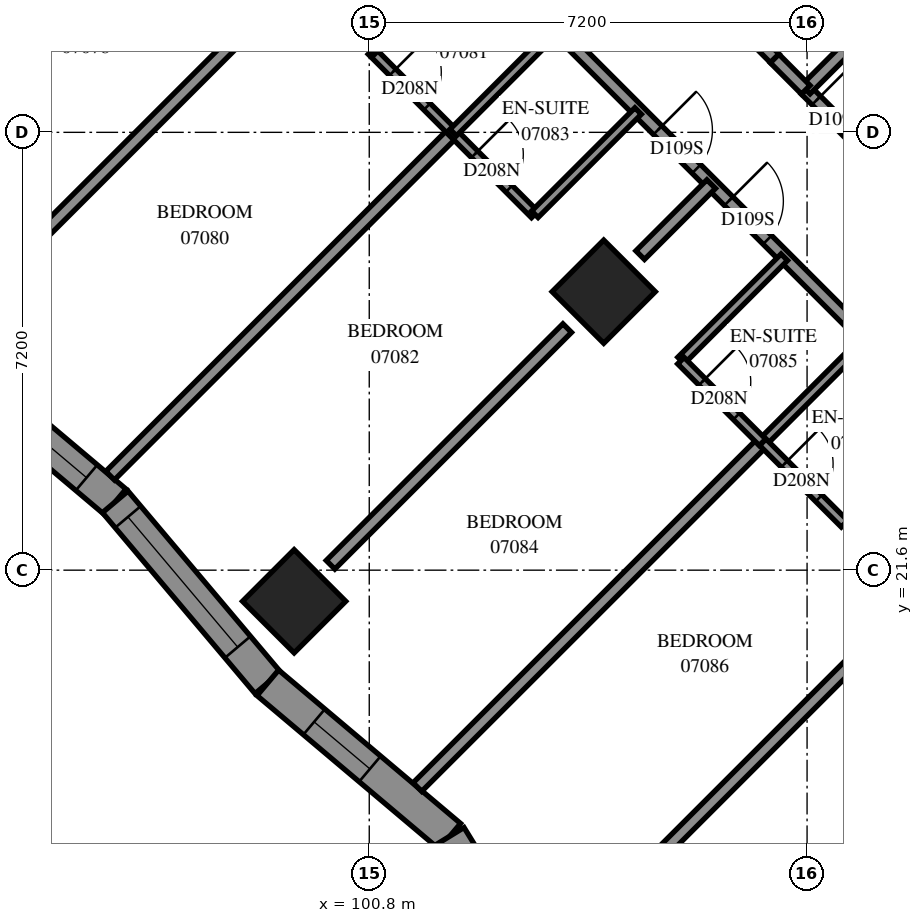
"""IFC4 building model, lengths in metres.
Left out: names, types, materials, properties, quantities, classifications, styles, units other than length and angle.
Written with IfcOpenShell. Run it as: python <this file> out.ifc"""

import sys

from ifc_helpers import new_model, si_unit, direction, frame, frame_2d, origin, origin_2d, place, context, subcontext, project, spatial, polyline, rectangle, outline, extrude, element, fill, save


model = new_model("IFC4")
c1 = context("Model", 3, precision=1e-05, world=origin(), true_north=direction((0.0, 1.0)))
c2 = subcontext(c1, "Body", "Model", "MODEL_VIEW")
j1 = project(units=[si_unit("LENGTHUNIT", "METRE"), si_unit("PLANEANGLEUNIT", "RADIAN")], contexts=[c1])
p1 = place(None, origin())
s1 = spatial("IfcSite", under=j1, at=p1, CompositionType="ELEMENT")
p2 = place(p1, origin())
s2 = spatial("IfcBuilding", under=s1, at=p2, CompositionType="ELEMENT")
p3 = place(p2, frame((0.0, 0.0, 30.4)))
s3 = spatial("IfcBuildingStorey", under=s2, at=p3, CompositionType="ELEMENT", Elevation=30.4)
for number, where, z_axis, x_axis in (
    (1, (104.656, 26.18, 0.0), (0.0, 0.0, 1.0), (0.707, -0.707, 0.0)),
    (2, (99.565, 21.088, 0.0), (0.0, 0.0, 1.0), (0.707, -0.707, 0.0)),
):
    element("IfcColumn", number, at=place(p3, frame(where, z_axis=z_axis, x_axis=x_axis)), inside=s3, PredefinedType="COLUMN", context=c2, shape_type="SweptSolid", body=[
        extrude(rectangle(XDim=1.2, YDim=1.2, at=origin_2d()), origin(), (0.0, 0.0, 1.0), 3.1),
    ])
p4 = place(p3, frame((93.647, 25.233, 0.0), z_axis=(0.0, 0.0, 1.0), x_axis=(0.7645046987, -0.6446181549, 0.0)))
e3 = element("IfcWall", 3, at=p4, inside=s3, PredefinedType="SOLIDWALL", context=c2, shape_type="SweptSolid", body=[
    extrude(outline(polyline([(-0.023, -0.275), (3.869, -0.275), (3.916, 0.275), (0.023, 0.275), (-0.023, -0.275)])), origin(), (0.0, 0.0, 1.0), 3.1),
])
p5 = place(p4, frame((0.476, 0.0, 0.5)))
e4 = element("IfcOpeningElement", 4, at=p5, cuts=e3, PredefinedType="OPENING", context=c2, shape_type="SweptSolid", body=[
    extrude(rectangle(XDim=2.8, YDim=2.45, at=frame_2d((1.4, 1.225))), frame((0.0, 0.285, 0.0), z_axis=(0.0, -1.0, 0.0), x_axis=(1.0, 0.0, 0.0)), (0.0, 0.0, 1.0), 0.57),
])
p6 = place(p3, frame((96.623, 22.724, 0.0), z_axis=(0.0, 0.0, 1.0), x_axis=(0.6446181549, -0.7645046987, 0.0)))
e5 = element("IfcWall", 5, at=p6, inside=s3, PredefinedType="SOLIDWALL", context=c2, shape_type="SweptSolid", body=[
    extrude(outline(polyline([(0.023, -0.275), (3.916, -0.275), (3.869, 0.275), (-0.023, 0.275), (0.023, -0.275)])), origin(), (0.0, 0.0, 1.0), 3.1),
])
p7 = place(p6, frame((0.324, 0.0, 0.5)))
e6 = element("IfcOpeningElement", 6, at=p7, cuts=e5, PredefinedType="OPENING", context=c2, shape_type="SweptSolid", body=[
    extrude(rectangle(XDim=2.8, YDim=2.45, at=frame_2d((1.4, 1.225))), frame((0.0, 0.285, 0.0), z_axis=(0.0, -1.0, 0.0), x_axis=(1.0, 0.0, 0.0)), (0.0, 0.0, 1.0), 0.57),
])
p8 = place(p3, frame((99.132, 19.747, 0.0), z_axis=(0.0, 0.0, 1.0), x_axis=(0.7645141753, -0.6446069156, 0.0)))
e7 = element("IfcWall", 7, at=p8, inside=s3, PredefinedType="SOLIDWALL", context=c2, shape_type="SweptSolid", body=[
    extrude(outline(polyline([(-0.023, -0.275), (3.869, -0.275), (3.958, 0.275), (0.023, 0.275), (-0.023, -0.275)])), origin(), (0.0, 0.0, 1.0), 3.1),
])
p9 = place(p8, frame((0.996, 0.0, 0.5)))
e8 = element("IfcOpeningElement", 8, at=p9, cuts=e7, PredefinedType="OPENING", context=c2, shape_type="SweptSolid", body=[
    extrude(rectangle(XDim=1.2, YDim=2.45, at=frame_2d((0.6, 1.225))), frame((0.0, 0.285, 0.0), z_axis=(0.0, -1.0, 0.0), x_axis=(1.0, 0.0, 0.0)), (0.0, 0.0, 1.0), 0.57),
])
p10 = place(p3, frame((102.124, 17.224, 0.0), z_axis=(0.0, 0.0, 1.0), x_axis=(0.5227306608, -0.8524978922, 0.0)))
e9 = element("IfcWall", 9, at=p10, inside=s3, PredefinedType="SOLIDWALL", context=c2, shape_type="SweptSolid", body=[
    extrude(outline(polyline([(0.044, -0.275), (4.033, -0.275), (3.588, 0.275), (-0.044, 0.275), (0.044, -0.275)])), origin(), (0.0, 0.0, 1.0), 3.1),
])
p11 = place(p10, frame((0.867, 0.0, 0.5)))
e10 = element("IfcOpeningElement", 10, at=p11, cuts=e9, PredefinedType="OPENING", context=c2, shape_type="SweptSolid", body=[
    extrude(rectangle(XDim=1.2, YDim=2.45, at=frame_2d((0.6, 1.225))), frame((0.0, 0.285, 0.0), z_axis=(0.0, -1.0, 0.0), x_axis=(1.0, 0.0, 0.0)), (0.0, 0.0, 1.0), 0.57),
])
p12 = place(p3, frame((102.609, 31.769, 0.0), z_axis=(0.0, 0.0, 1.0), x_axis=(0.7071067812, -0.7071067812, 0.0)))
e11 = element("IfcWall", 11, at=p12, inside=s3, PredefinedType="PARTITIONING", context=c2, shape_type="SweptSolid", body=[
    extrude(rectangle(XDim=10.723, YDim=0.2, at=frame_2d((5.361, 0.0))), origin(), (0.0, 0.0, 1.0), 3.1),
])
p13 = place(p12, frame((4.15, 0.0, 0.0)))
e12 = element("IfcOpeningElement", 12, at=p13, cuts=e11, PredefinedType="OPENING", context=c2, shape_type="SweptSolid", body=[
    extrude(rectangle(XDim=0.9, YDim=2.1, at=frame_2d((0.45, 1.05))), frame((0.0, 0.11, 0.0), z_axis=(0.0, -1.0, 0.0), x_axis=(1.0, 0.0, 0.0)), (0.0, 0.0, 1.0), 0.22),
])
p14 = place(p12, frame((5.8, 0.0, 0.0)))
e13 = element("IfcOpeningElement", 13, at=p14, cuts=e11, PredefinedType="OPENING", context=c2, shape_type="SweptSolid", body=[
    extrude(rectangle(XDim=0.9, YDim=2.1, at=frame_2d((0.45, 1.05))), frame((0.0, 0.11, 0.0), z_axis=(0.0, -1.0, 0.0), x_axis=(1.0, 0.0, 0.0)), (0.0, 0.0, 1.0), 0.22),
])
p15 = place(p3, frame((101.592, 18.033, 0.0), z_axis=(0.0, 0.0, 1.0), x_axis=(0.7072375867, 0.7069759514, 0.0)))
e14 = element("IfcWall", 14, at=p15, inside=s3, PredefinedType="PARTITIONING", context=c2, shape_type="SweptSolid", body=[
    extrude(rectangle(XDim=8.026, YDim=0.2, at=frame_2d((4.013, 0.0))), origin(), (0.0, 0.0, 1.0), 3.1),
])
p16 = place(p3, frame((96.538, 23.155, 0.0), z_axis=(0.0, 0.0, 1.0), x_axis=(0.7071130469, 0.7071005154, 0.0)))
e15 = element("IfcWall", 15, at=p16, inside=s3, PredefinedType="PARTITIONING", context=c2, shape_type="SweptSolid", body=[
    extrude(rectangle(XDim=7.98, YDim=0.2, at=frame_2d((3.99, 0.0))), origin(), (0.0, 0.0, 1.0), 3.1),
])
p17 = place(p3, frame((91.461, 28.252, 0.0), z_axis=(0.0, 0.0, 1.0), x_axis=(0.7072323284, 0.7069812117, 0.0)))
e16 = element("IfcWall", 16, at=p17, inside=s3, PredefinedType="PARTITIONING", context=c2, shape_type="SweptSolid", body=[
    extrude(rectangle(XDim=7.964, YDim=0.2, at=frame_2d((3.982, 0.0))), origin(), (0.0, 0.0, 1.0), 3.1),
])
p18 = place(p3, frame((107.977, 29.499, 0.0), z_axis=(0.0, 0.0, 1.0), x_axis=(0.7071067812, -0.7071067812, 0.0)))
e17 = element("IfcWall", 17, at=p18, inside=s3, PredefinedType="PARTITIONING", context=c2, shape_type="SweptSolid", body=[
    extrude(rectangle(XDim=7.198, YDim=0.2, at=frame_2d((3.599, 0.0))), origin(), (0.0, 0.0, 1.0), 3.1),
])
p19 = place(p18, frame((0.247, 0.0, 0.0)))
e18 = element("IfcOpeningElement", 18, at=p19, cuts=e17, PredefinedType="OPENING", context=c2, shape_type="SweptSolid", body=[
    extrude(rectangle(XDim=0.9, YDim=2.1, at=frame_2d((0.45, 1.05))), frame((0.0, 0.11, 0.0), z_axis=(0.0, -1.0, 0.0), x_axis=(1.0, 0.0, 0.0)), (0.0, 0.0, 1.0), 0.22),
])
p20 = place(p18, frame((5.899, 0.0, 0.0)))
e19 = element("IfcOpeningElement", 19, at=p20, cuts=e17, PredefinedType="OPENING", context=c2, shape_type="SweptSolid", body=[
    extrude(rectangle(XDim=0.9, YDim=2.1, at=frame_2d((0.45, 1.05))), frame((0.0, 0.11, 0.0), z_axis=(0.0, -1.0, 0.0), x_axis=(1.0, 0.0, 0.0)), (0.0, 0.0, 1.0), 0.22),
])
p21 = place(p3, frame((105.255, 16.599, 0.0), z_axis=(0.0, 0.0, 1.0), x_axis=(0.7071067812, 0.7071067812, 0.0)))
e20 = element("IfcWall", 20, at=p21, inside=s3, PredefinedType="PARTITIONING", context=c2, shape_type="SweptSolid", body=[
    extrude(rectangle(XDim=5.504, YDim=0.2, at=frame_2d((2.752, 0.0))), origin(), (0.0, 0.0, 1.0), 2.6),
])
p22 = place(p3, frame((100.163, 21.689, 0.0), z_axis=(0.0, 0.0, 1.0), x_axis=(0.7071067812, 0.7071067812, 0.0)))
e21 = element("IfcWall", 21, at=p22, inside=s3, PredefinedType="PARTITIONING", context=c2, shape_type="SweptSolid", body=[
    extrude(rectangle(XDim=5.504, YDim=0.2, at=frame_2d((2.752, 0.0))), origin(), (0.0, 0.0, 1.0), 3.1),
])
p23 = place(p3, frame((95.073, 26.781, 0.0), z_axis=(0.0, 0.0, 1.0), x_axis=(0.7071067812, 0.7071067812, 0.0)))
e22 = element("IfcWall", 22, at=p23, inside=s3, PredefinedType="PARTITIONING", context=c2, shape_type="SweptSolid", body=[
    extrude(rectangle(XDim=5.501, YDim=0.2, at=frame_2d((2.751, 0.0))), origin(), (0.0, 0.0, 1.0), 3.1),
])
p24 = place(p3, frame((100.836, 30.138, 0.0), z_axis=(0.0, 0.0, 1.0), x_axis=(0.7065802685, -0.7076329021, 0.0)))
e23 = element("IfcWall", 23, at=p24, inside=s3, PredefinedType="PARTITIONING", context=c2, shape_type="SweptSolid", body=[
    extrude(rectangle(XDim=3.8, YDim=0.15, at=frame_2d((1.9, 0.0))), origin(), (0.0, 0.0, 1.0), 3.1),
])
p25 = place(p24, frame((0.493, 0.0, 0.0)))
e24 = element("IfcOpeningElement", 24, at=p25, cuts=e23, PredefinedType="OPENING", context=c2, shape_type="SweptSolid", body=[
    extrude(rectangle(XDim=0.8, YDim=2.1, at=frame_2d((0.4, 1.05))), frame((0.0, 0.085, 0.0), z_axis=(0.0, -1.0, 0.0), x_axis=(1.0, 0.0, 0.0)), (0.0, 0.0, 1.0), 0.17),
])
p26 = place(p24, frame((2.402, 0.0, 0.0)))
e25 = element("IfcOpeningElement", 25, at=p26, cuts=e23, PredefinedType="OPENING", context=c2, shape_type="SweptSolid", body=[
    extrude(rectangle(XDim=0.8, YDim=2.1, at=frame_2d((0.4, 1.05))), frame((0.0, 0.085, 0.0), z_axis=(0.0, -1.0, 0.0), x_axis=(1.0, 0.0, 0.0)), (0.0, 0.0, 1.0), 0.17),
])
p27 = place(p3, frame((105.435, 32.049, 0.0), z_axis=(0.0, 0.0, 1.0), x_axis=(0.7074545101, -0.7067588812, 0.0)))
e26 = element("IfcWall", 26, at=p27, inside=s3, PredefinedType="PARTITIONING", context=c2, shape_type="SweptSolid", body=[
    extrude(rectangle(XDim=2.875, YDim=0.2, at=frame_2d((1.438, 0.0))), origin(), (0.0, 0.0, 1.0), 3.1),
])
for number, where, z_axis, x_axis in (
    (27, (103.523, 27.453, 0.0), (0.0, 0.0, 1.0), (0.707, 0.707, 0.0)),
    (28, (105.927, 25.049, 0.0), (0.0, 0.0, 1.0), (0.707, 0.707, 0.0)),
    (29, (107.271, 23.705, 0.0), (0.0, 0.0, 1.0), (0.707, 0.707, 0.0)),
):
    element("IfcWall", number, at=place(p3, frame(where, z_axis=z_axis, x_axis=x_axis)), inside=s3, PredefinedType="PARTITIONING", context=c2, shape_type="SweptSolid", body=[
        extrude(rectangle(XDim=2.401, YDim=0.15, at=frame_2d((1.201, 0.0))), origin(), (0.0, 0.0, 1.0), 3.1),
    ])
for number, where, z_axis, x_axis in (
    (30, (100.837, 30.141, 0.0), (0.0, 0.0, 1.0), (0.707, 0.707, 0.0)),
    (31, (108.615, 22.363, 0.0), (0.0, 0.0, 1.0), (0.707, 0.707, 0.0)),
    (32, (102.181, 28.797, 0.0), (0.0, 0.0, 1.0), (0.707, 0.707, 0.0)),
):
    element("IfcWall", number, at=place(p3, frame(where, z_axis=z_axis, x_axis=x_axis)), inside=s3, PredefinedType="PARTITIONING", context=c2, shape_type="SweptSolid", body=[
        extrude(rectangle(XDim=2.398, YDim=0.15, at=frame_2d((1.199, 0.0))), origin(), (0.0, 0.0, 1.0), 3.1),
    ])
p28 = place(p3, frame((105.925, 25.045, 0.0), z_axis=(0.0, 0.0, 1.0), x_axis=(0.7071067812, -0.7071067812, 0.0)))
e33 = element("IfcWall", 33, at=p28, inside=s3, PredefinedType="PARTITIONING", context=c2, shape_type="SweptSolid", body=[
    extrude(rectangle(XDim=1.901, YDim=0.15, at=frame_2d((0.95, 0.0))), origin(), (0.0, 0.0, 1.0), 3.1),
])
p29 = place(p28, frame((0.493, 0.0, 0.0)))
e34 = element("IfcOpeningElement", 34, at=p29, cuts=e33, PredefinedType="OPENING", context=c2, shape_type="SweptSolid", body=[
    extrude(rectangle(XDim=0.8, YDim=2.1, at=frame_2d((0.4, 1.05))), frame((0.0, 0.085, 0.0), z_axis=(0.0, -1.0, 0.0), x_axis=(1.0, 0.0, 0.0)), (0.0, 0.0, 1.0), 0.17),
])
p30 = place(p3, frame((107.272, 23.704, 0.0), z_axis=(0.0, 0.0, 1.0), x_axis=(0.7076330979, -0.7065800724, 0.0)))
e35 = element("IfcWall", 35, at=p30, inside=s3, PredefinedType="PARTITIONING", context=c2, shape_type="SweptSolid", body=[
    extrude(rectangle(XDim=1.899, YDim=0.15, at=frame_2d((0.95, 0.0))), origin(), (0.0, 0.0, 1.0), 3.1),
])
p31 = place(p30, frame((0.503, 0.0, 0.0)))
e36 = element("IfcOpeningElement", 36, at=p31, cuts=e35, PredefinedType="OPENING", context=c2, shape_type="SweptSolid", body=[
    extrude(rectangle(XDim=0.8, YDim=2.1, at=frame_2d((0.4, 1.05))), frame((0.0, 0.085, 0.0), z_axis=(0.0, -1.0, 0.0), x_axis=(1.0, 0.0, 0.0)), (0.0, 0.0, 1.0), 0.17),
])
for number, where, z_axis, x_axis in (
    (37, (105.255, 26.781, 0.0), (0.0, 0.0, 1.0), (0.707, 0.707, 0.0)),
    (38, (107.978, 29.504, 0.0), (0.0, 0.0, 1.0), (0.707, 0.707, 0.0)),
):
    element("IfcWall", number, at=place(p3, frame(where, z_axis=z_axis, x_axis=x_axis)), inside=s3, PredefinedType="PARTITIONING", context=c2, shape_type="SweptSolid", body=[
        extrude(rectangle(XDim=1.652, YDim=0.2, at=frame_2d((0.826, 0.0))), origin(), (0.0, 0.0, 1.0), 3.1),
    ])
p32 = place(p3, frame((107.466, 30.014, 0.0), z_axis=(0.0, 0.0, 1.0), x_axis=(0.7057270646, -0.7084838109, 0.0)))
e39 = element("IfcWall", 39, at=p32, inside=s3, PredefinedType="PARTITIONING", context=c2, shape_type="SweptSolid", body=[
    extrude(rectangle(XDim=0.726, YDim=0.2, at=frame_2d((0.363, 0.0))), origin(), (0.0, 0.0, 1.0), 3.1),
])
p33 = place(p5, origin())
e40 = element("IfcWindow", 40, at=p33, inside=s3, PartitioningType="SINGLE_PANEL", PredefinedType="WINDOW", context=c2, shape_type="SweptSolid", body=[
    extrude(rectangle(XDim=2.8, YDim=2.45, at=frame_2d((1.4, 1.225))), frame((0.0, 0.155, 0.0), z_axis=(0.0, -1.0, 0.0), x_axis=(1.0, 0.0, 0.0)), (0.0, 0.0, 1.0), 0.06),
])
fill(e4, e40)
p34 = place(p7, origin())
e41 = element("IfcWindow", 41, at=p34, inside=s3, PartitioningType="SINGLE_PANEL", PredefinedType="WINDOW", context=c2, shape_type="SweptSolid", body=[
    extrude(rectangle(XDim=2.8, YDim=2.45, at=frame_2d((1.4, 1.225))), frame((0.0, 0.155, 0.0), z_axis=(0.0, -1.0, 0.0), x_axis=(1.0, 0.0, 0.0)), (0.0, 0.0, 1.0), 0.06),
])
fill(e6, e41)
p35 = place(p9, origin())
e42 = element("IfcWindow", 42, at=p35, inside=s3, PartitioningType="SINGLE_PANEL", PredefinedType="WINDOW", context=c2, shape_type="SweptSolid", body=[
    extrude(rectangle(XDim=1.2, YDim=2.45, at=frame_2d((0.6, 1.225))), frame((0.0, 0.155, 0.0), z_axis=(0.0, -1.0, 0.0), x_axis=(1.0, 0.0, 0.0)), (0.0, 0.0, 1.0), 0.06),
])
fill(e8, e42)
p36 = place(p19, origin())
e43 = element("IfcDoor", 43, at=p36, inside=s3, OperationType="SINGLE_SWING_LEFT", PredefinedType="DOOR", context=c2, shape_type="SweptSolid", body=[
    extrude(rectangle(XDim=0.9, YDim=2.1, at=frame_2d((0.45, 1.05))), frame((0.0, 0.025, 0.0), z_axis=(0.0, -1.0, 0.0), x_axis=(1.0, 0.0, 0.0)), (0.0, 0.0, 1.0), 0.05),
])
fill(e18, e43)
p37 = place(p25, origin())
e44 = element("IfcDoor", 44, at=p37, inside=s3, OperationType="SINGLE_SWING_RIGHT", PredefinedType="DOOR", context=c2, shape_type="SweptSolid", body=[
    extrude(rectangle(XDim=0.8, YDim=2.1, at=frame_2d((0.4, 1.05))), frame((0.0, 0.025, 0.0), z_axis=(0.0, -1.0, 0.0), x_axis=(1.0, 0.0, 0.0)), (0.0, 0.0, 1.0), 0.05),
])
fill(e24, e44)
p38 = place(p13, origin())
e45 = element("IfcDoor", 45, at=p38, inside=s3, OperationType="SINGLE_SWING_LEFT", PredefinedType="DOOR", context=c2, shape_type="SweptSolid", body=[
    extrude(rectangle(XDim=0.9, YDim=2.1, at=frame_2d((0.45, 1.05))), frame((0.0, 0.025, 0.0), z_axis=(0.0, -1.0, 0.0), x_axis=(1.0, 0.0, 0.0)), (0.0, 0.0, 1.0), 0.05),
])
fill(e12, e45)
p39 = place(p26, origin())
e46 = element("IfcDoor", 46, at=p39, inside=s3, OperationType="SINGLE_SWING_RIGHT", PredefinedType="DOOR", context=c2, shape_type="SweptSolid", body=[
    extrude(rectangle(XDim=0.8, YDim=2.1, at=frame_2d((0.4, 1.05))), frame((0.0, 0.025, 0.0), z_axis=(0.0, -1.0, 0.0), x_axis=(1.0, 0.0, 0.0)), (0.0, 0.0, 1.0), 0.05),
])
fill(e25, e46)
p40 = place(p14, origin())
e47 = element("IfcDoor", 47, at=p40, inside=s3, OperationType="SINGLE_SWING_RIGHT", PredefinedType="DOOR", context=c2, shape_type="SweptSolid", body=[
    extrude(rectangle(XDim=0.9, YDim=2.1, at=frame_2d((0.45, 1.05))), frame((0.0, 0.025, 0.0), z_axis=(0.0, -1.0, 0.0), x_axis=(1.0, 0.0, 0.0)), (0.0, 0.0, 1.0), 0.05),
])
fill(e13, e47)
p41 = place(p29, origin())
e48 = element("IfcDoor", 48, at=p41, inside=s3, OperationType="SINGLE_SWING_RIGHT", PredefinedType="DOOR", context=c2, shape_type="SweptSolid", body=[
    extrude(rectangle(XDim=0.8, YDim=2.1, at=frame_2d((0.4, 1.05))), frame((0.0, 0.025, 0.0), z_axis=(0.0, -1.0, 0.0), x_axis=(1.0, 0.0, 0.0)), (0.0, 0.0, 1.0), 0.05),
])
fill(e34, e48)
p42 = place(p31, origin())
e49 = element("IfcDoor", 49, at=p42, inside=s3, OperationType="SINGLE_SWING_RIGHT", PredefinedType="DOOR", context=c2, shape_type="SweptSolid", body=[
    extrude(rectangle(XDim=0.8, YDim=2.1, at=frame_2d((0.4, 1.05))), frame((0.0, 0.025, 0.0), z_axis=(0.0, -1.0, 0.0), x_axis=(1.0, 0.0, 0.0)), (0.0, 0.0, 1.0), 0.05),
])
fill(e36, e49)
save(model, sys.argv[1])
